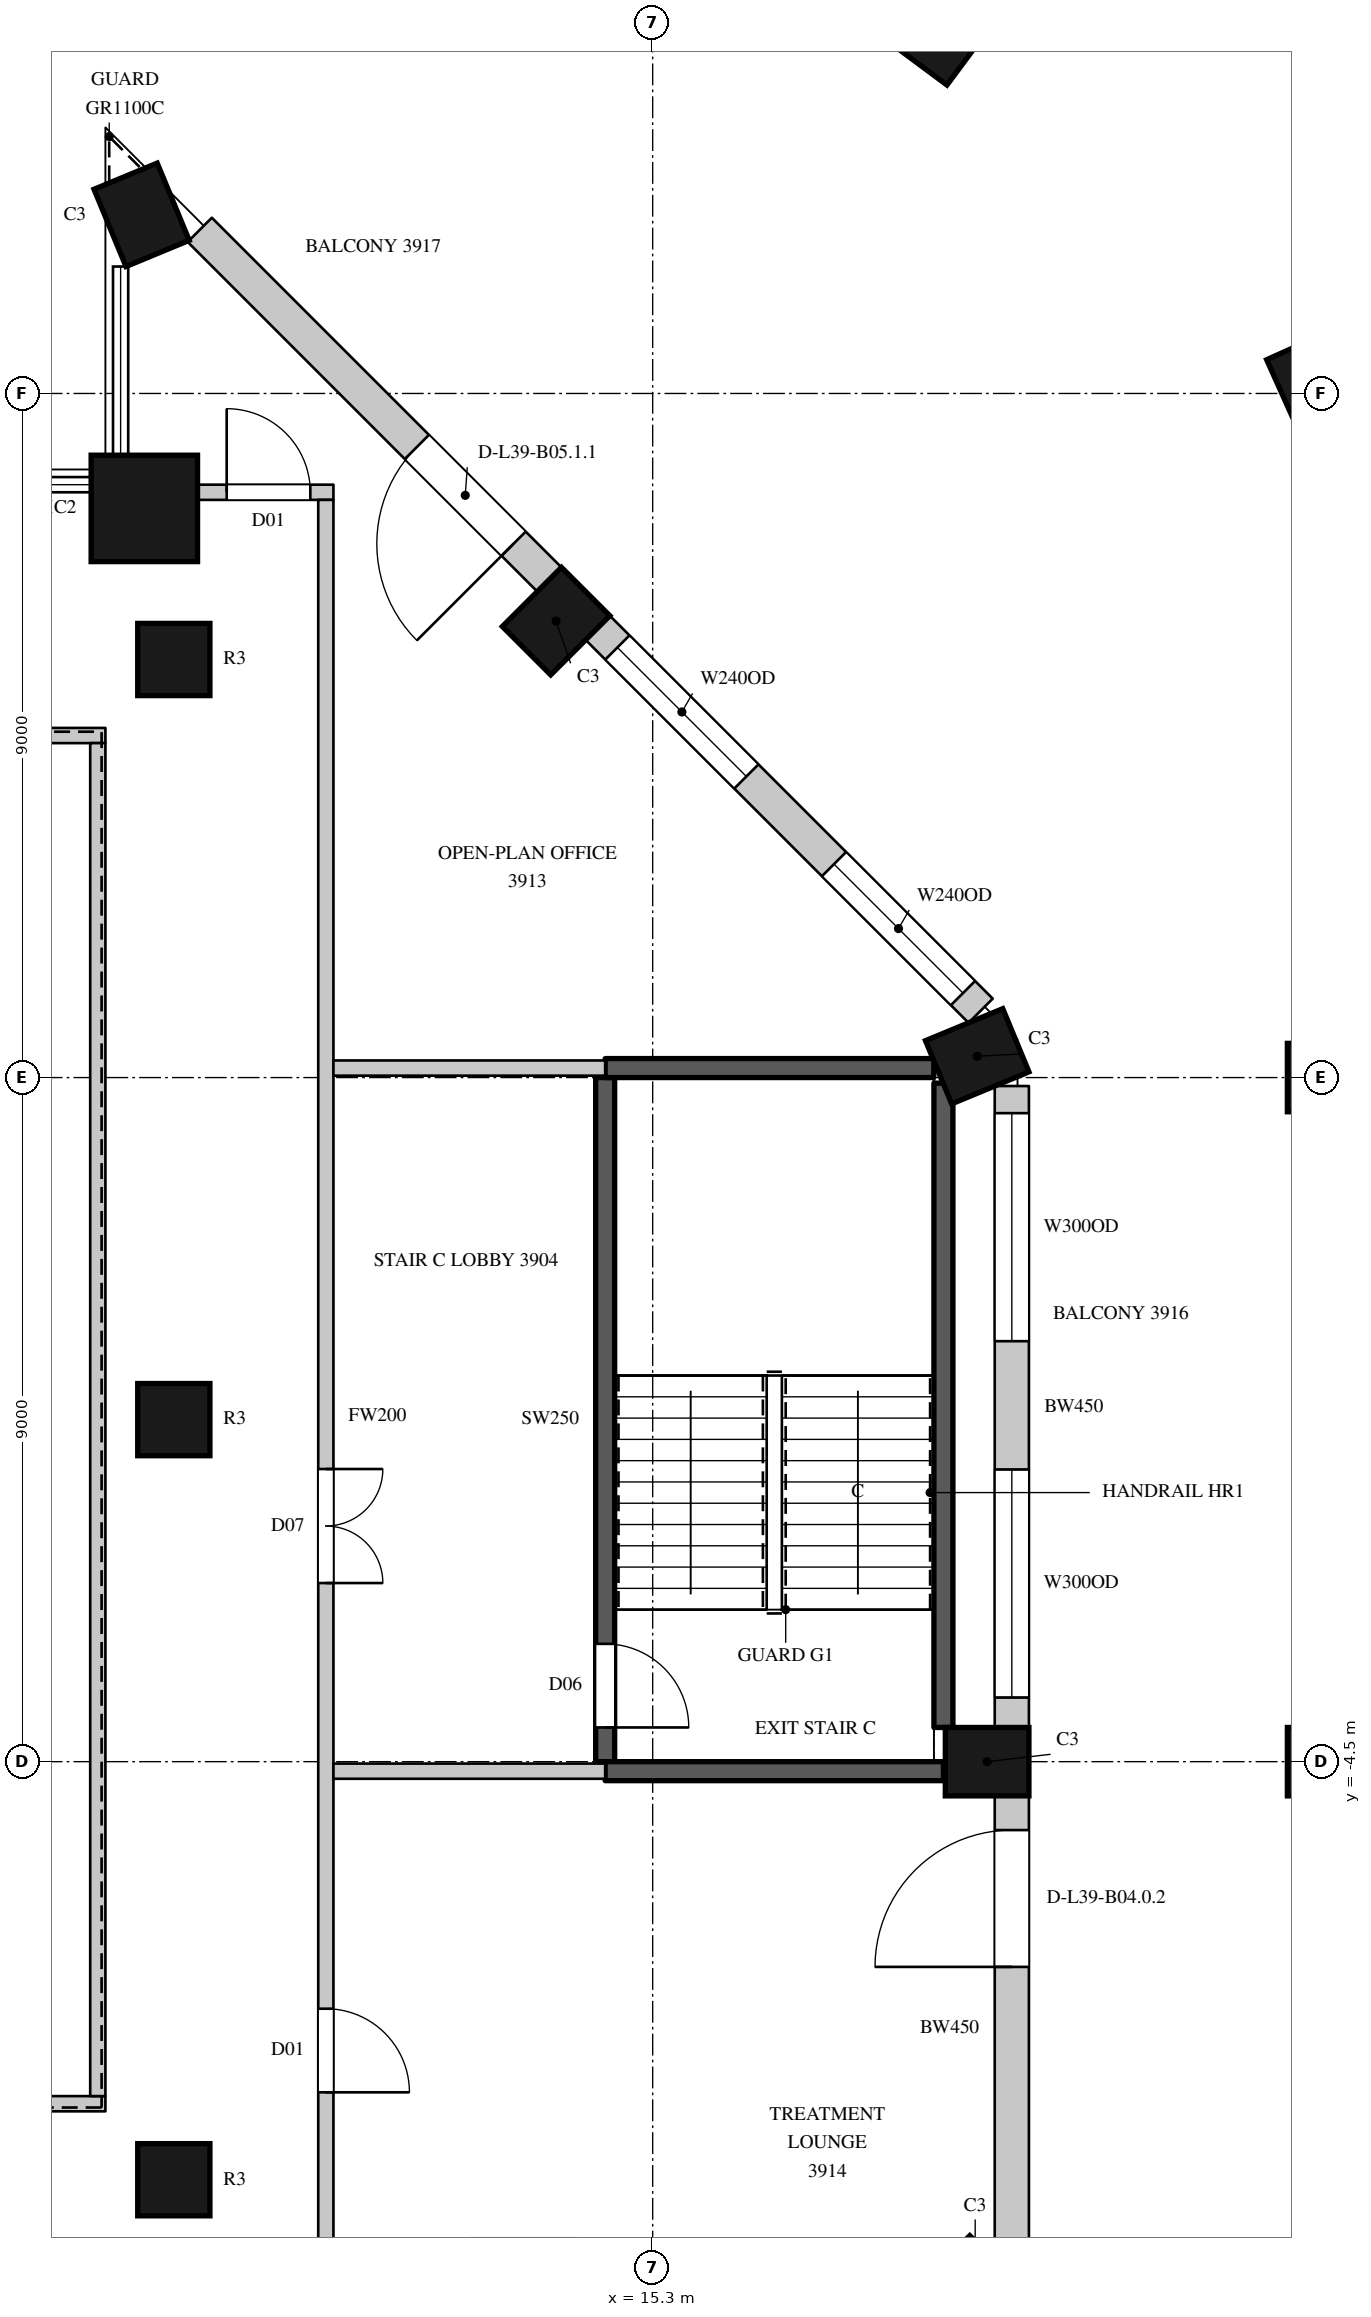
"""IFC4 building model, lengths in metres.
Left out: names, types, materials, properties, quantities, classifications, styles, units other than length and angle.
Written with IfcOpenShell. Run it as: python <this file> out.ifc"""

import sys

from ifc_helpers import new_model, si_unit, direction, frame, frame_2d, origin, origin_2d, place, context, subcontext, project, spatial, rectangle, circle, extrude, element, fill, save


model = new_model("IFC4")
c1 = context("Model", 3, precision=1e-05, world=origin(), true_north=direction((0.0, 1.0)))
c2 = subcontext(c1, "Body", "Model", "MODEL_VIEW")
j1 = project(units=[si_unit("LENGTHUNIT", "METRE"), si_unit("PLANEANGLEUNIT", "RADIAN")], contexts=[c1])
p1 = place(None, origin())
s1 = spatial("IfcSite", under=j1, at=p1, CompositionType="ELEMENT")
p2 = place(p1, origin())
s2 = spatial("IfcBuilding", under=s1, at=p2, CompositionType="ELEMENT")
p3 = place(p2, frame((0.0, 0.0, 181.0)))
s3 = spatial("IfcBuildingStorey", under=s2, at=p3, CompositionType="ELEMENT", Elevation=181.0)
for number, where, z_axis, x_axis in (
    (1, (19.543, -11.443, 0.0), (0.0, 0.0, 1.0), (0.707, 0.707, 0.0)),
    (2, (19.7, -4.5, 0.0), (0.0, 0.0, 1.0), (0.0, 1.0, 0.0)),
    (3, (19.57, 4.78, 0.0), (0.0, 0.0, 1.0), (-0.383, 0.924, 0.0)),
    (4, (14.029, 10.505, 0.0), (0.0, 0.0, 1.0), (-0.707, 0.707, 0.0)),
    (5, (8.576, 15.85, 0.0), (0.0, 0.0, 1.0), (-0.924, -0.383, 0.0)),
):
    element("IfcColumn", number, at=place(p3, frame(where, z_axis=z_axis, x_axis=x_axis)), inside=s3, PredefinedType="COLUMN", context=c2, shape_type="SweptSolid", body=[
        extrude(rectangle(XDim=0.9, YDim=1.1, at=origin_2d()), origin(), (0.0, 0.0, 1.0), 4.1),
    ])
p4 = place(p3, frame((8.612, 11.988, 0.0), z_axis=(0.0, 0.0, 1.0), x_axis=(1.0, 0.0, 0.0)))
e6 = element("IfcColumn", 6, at=p4, inside=s3, PredefinedType="COLUMN", context=c2, shape_type="SweptSolid", body=[
    extrude(circle(Radius=0.7, at=origin_2d()), origin(), (0.0, 0.0, 1.0), 4.1),
])
for number, where, z_axis, x_axis in (
    (7, (24.043, -11.443, 0.0), (0.0, 0.0, 1.0), (0.707, 0.707, 0.0)),
    (8, (24.2, -4.5, 0.0), (0.0, 0.0, 1.0), (0.0, 1.0, 0.0)),
    (9, (24.2, 4.5, 0.0), (0.0, 0.0, 1.0), (0.0, 1.0, 0.0)),
    (10, (24.064, 13.759, 0.0), (0.0, 0.0, 1.0), (-0.41, 0.912, 0.0)),
    (11, (19.138, 18.268, 0.0), (0.0, 0.0, 1.0), (-0.803, 0.596, 0.0)),
):
    element("IfcColumn", number, at=place(p3, frame(where, z_axis=z_axis, x_axis=x_axis)), inside=s3, PredefinedType="COLUMN", context=c2, shape_type="SweptSolid", body=[
        extrude(rectangle(XDim=0.9, YDim=1.1, at=origin_2d()), origin(), (0.0, 0.0, 1.0), 4.1),
    ])
for number, where, z_axis, x_axis in (
    (12, (9.0, -10.0, 0.0), (0.0, 0.0, 1.0), (1.0, 0.0, 0.0)),
    (13, (9.0, 0.0, 0.0), (0.0, 0.0, 1.0), (1.0, 0.0, 0.0)),
    (14, (9.0, 10.0, 0.0), (0.0, 0.0, 1.0), (1.0, 0.0, 0.0)),
):
    element("IfcColumn", number, at=place(p3, frame(where, z_axis=z_axis, x_axis=x_axis)), inside=s3, PredefinedType="COLUMN", context=c2, shape_type="SweptSolid", body=[
        extrude(circle(Radius=0.475, at=origin_2d()), origin(), (0.0, 0.0, 1.0), 4.1),
    ])
p5 = place(p3, frame((20.025, -11.064, 0.0), z_axis=(0.0, 0.0, 1.0), x_axis=(0.0, 1.0, 0.0)))
e15 = element("IfcWall", 15, at=p5, inside=s3, PredefinedType="SOLIDWALL", context=c2, shape_type="SweptSolid", body=[
    extrude(rectangle(XDim=6.114, YDim=0.45, at=frame_2d((3.057, 0.0))), origin(), (0.0, 0.0, 1.0), 3.8),
])
p6 = place(p5, frame((3.864, 0.0, 0.0)))
e16 = element("IfcOpeningElement", 16, at=p6, cuts=e15, PredefinedType="OPENING", context=c2, shape_type="SweptSolid", body=[
    extrude(rectangle(XDim=1.8, YDim=2.4, at=frame_2d((0.9, 1.2))), frame((0.0, 0.235, 0.0), z_axis=(0.0, -1.0, 0.0), x_axis=(1.0, 0.0, 0.0)), (0.0, 0.0, 1.0), 0.47),
])
p7 = place(p3, frame((20.025, -4.05, 0.0), z_axis=(0.0, 0.0, 1.0), x_axis=(0.0, 1.0, 0.0)))
e17 = element("IfcWall", 17, at=p7, inside=s3, PredefinedType="SOLIDWALL", context=c2, shape_type="SweptSolid", body=[
    extrude(rectangle(XDim=8.439, YDim=0.45, at=frame_2d((4.219, 0.0))), origin(), (0.0, 0.0, 1.0), 3.8),
])
p8 = place(p7, frame((0.394, 0.0, 1.05)))
e18 = element("IfcOpeningElement", 18, at=p8, cuts=e17, PredefinedType="OPENING", context=c2, shape_type="SweptSolid", body=[
    extrude(rectangle(XDim=3.0, YDim=2.4, at=frame_2d((1.5, 1.2))), frame((0.0, 0.235, 0.0), z_axis=(0.0, -1.0, 0.0), x_axis=(1.0, 0.0, 0.0)), (0.0, 0.0, 1.0), 0.47),
])
p9 = place(p7, frame((5.082, 0.0, 1.05)))
e19 = element("IfcOpeningElement", 19, at=p9, cuts=e17, PredefinedType="OPENING", context=c2, shape_type="SweptSolid", body=[
    extrude(rectangle(XDim=3.0, YDim=2.4, at=frame_2d((1.5, 1.2))), frame((0.0, 0.235, 0.0), z_axis=(0.0, -1.0, 0.0), x_axis=(1.0, 0.0, 0.0)), (0.0, 0.0, 1.0), 0.47),
])
p10 = place(p3, frame((19.615, 5.379, 0.0), z_axis=(0.0, 0.0, 1.0), x_axis=(-0.707089646058, 0.7071239159, 0.0)))
e20 = element("IfcWall", 20, at=p10, inside=s3, PredefinedType="SOLIDWALL", context=c2, shape_type="SweptSolid", body=[
    extrude(rectangle(XDim=7.124, YDim=0.45, at=frame_2d((3.562, 0.0))), origin(), (0.0, 0.0, 1.0), 3.8),
])
p11 = place(p10, frame((0.328, 0.0, 1.05)))
e21 = element("IfcOpeningElement", 21, at=p11, cuts=e20, PredefinedType="OPENING", context=c2, shape_type="SweptSolid", body=[
    extrude(rectangle(XDim=2.4, YDim=2.4, at=frame_2d((1.2, 1.2))), frame((0.0, 0.235, 0.0), z_axis=(0.0, -1.0, 0.0), x_axis=(1.0, 0.0, 0.0)), (0.0, 0.0, 1.0), 0.47),
])
p12 = place(p10, frame((4.359, 0.0, 1.05)))
e22 = element("IfcOpeningElement", 22, at=p12, cuts=e20, PredefinedType="OPENING", context=c2, shape_type="SweptSolid", body=[
    extrude(rectangle(XDim=2.4, YDim=2.4, at=frame_2d((1.2, 1.2))), frame((0.0, 0.235, 0.0), z_axis=(0.0, -1.0, 0.0), x_axis=(1.0, 0.0, 0.0)), (0.0, 0.0, 1.0), 0.47),
])
p13 = place(p3, frame((13.941, 11.053, 0.0), z_axis=(0.0, 0.0, 1.0), x_axis=(-0.707106781187, 0.707106781187, 0.0)))
e23 = element("IfcWall", 23, at=p13, inside=s3, PredefinedType="SOLIDWALL", context=c2, shape_type="SweptSolid", body=[
    extrude(rectangle(XDim=6.505, YDim=0.45, at=frame_2d((3.252, 0.0))), origin(), (0.0, 0.0, 1.0), 3.8),
])
p14 = place(p13, frame((0.665, 0.0, 0.0)))
e24 = element("IfcOpeningElement", 24, at=p14, cuts=e23, PredefinedType="OPENING", context=c2, shape_type="SweptSolid", body=[
    extrude(rectangle(XDim=1.8, YDim=2.4, at=frame_2d((0.9, 1.2))), frame((0.0, 0.235, 0.0), z_axis=(0.0, -1.0, 0.0), x_axis=(1.0, 0.0, 0.0)), (0.0, 0.0, 1.0), 0.47),
])
p15 = place(p3, frame((21.1, -0.617, 0.0), z_axis=(0.0, 0.0, 1.0), x_axis=(0.0, 1.0, 0.0)))
e25 = element("IfcWall", 25, at=p15, inside=s3, PredefinedType="SOLIDWALL", context=c2, shape_type="SweptSolid", body=[
    extrude(rectangle(XDim=2.567, YDim=0.45, at=frame_2d((1.283, 0.0))), origin(), (0.0, 0.0, 1.0), 0.6),
])
p16 = place(p3, frame((12.251, 14.263, 0.0), z_axis=(0.0, 0.0, 1.0), x_axis=(-0.707039709166, 0.707173846846, 0.0)))
e26 = element("IfcWall", 26, at=p16, inside=s3, PredefinedType="SOLIDWALL", context=c2, shape_type="SweptSolid", body=[
    extrude(rectangle(XDim=1.82, YDim=0.45, at=frame_2d((0.91, 0.0))), origin(), (0.0, 0.0, 1.0), 0.6),
])
for number, where, z_axis, x_axis in (
    (27, (-2.48, -9.0, 0.0), (0.0, 0.0, 1.0), (1.0, 0.0, 0.0)),
    (28, (-2.48, 9.0, 0.0), (0.0, 0.0, 1.0), (1.0, 0.0, 0.0)),
):
    element("IfcWall", number, at=place(p3, frame(where, z_axis=z_axis, x_axis=x_axis)), inside=s3, PredefinedType="PARTITIONING", context=c2, shape_type="SweptSolid", body=[
        extrude(rectangle(XDim=10.58, YDim=0.2, at=frame_2d((5.29, 0.0))), origin(), (0.0, 0.0, 1.0), 3.8),
    ])
p17 = place(p3, frame((8.0, -8.9, 0.0), z_axis=(0.0, 0.0, 1.0), x_axis=(0.0, 1.0, 0.0)))
e29 = element("IfcWall", 29, at=p17, inside=s3, PredefinedType="PARTITIONING", context=c2, shape_type="SweptSolid", body=[
    extrude(rectangle(XDim=17.8, YDim=0.2, at=frame_2d((8.9, 0.0))), origin(), (0.0, 0.0, 1.0), 3.8),
])
p18 = place(p3, frame((9.296, 12.2, 0.0), z_axis=(0.0, 0.0, 1.0), x_axis=(1.0, 0.0, 0.0)))
e30 = element("IfcWall", 30, at=p18, inside=s3, PredefinedType="PARTITIONING", context=c2, shape_type="SweptSolid", body=[
    extrude(rectangle(XDim=1.804, YDim=0.2, at=frame_2d((0.902, 0.0))), origin(), (0.0, 0.0, 1.0), 3.8),
])
p19 = place(p18, frame((0.4, 0.0, 0.0)))
e31 = element("IfcOpeningElement", 31, at=p19, cuts=e30, PredefinedType="OPENING", context=c2, shape_type="SweptSolid", body=[
    extrude(rectangle(XDim=1.1, YDim=2.4, at=frame_2d((0.55, 1.2))), frame((0.0, 0.11, 0.0), z_axis=(0.0, -1.0, 0.0), x_axis=(1.0, 0.0, 0.0)), (0.0, 0.0, 1.0), 0.22),
])
p20 = place(p3, frame((11.0, -12.0, 0.0), z_axis=(0.0, 0.0, 1.0), x_axis=(0.0, 1.0, 0.0)))
e32 = element("IfcWall", 32, at=p20, inside=s3, PredefinedType="PARTITIONING", context=c2, shape_type="SweptSolid", body=[
    extrude(rectangle(XDim=24.1, YDim=0.2, at=frame_2d((12.05, 0.0))), origin(), (0.0, 0.0, 1.0), 3.8),
])
p21 = place(p20, frame((9.85, 0.0, 0.0)))
e33 = element("IfcOpeningElement", 33, at=p21, cuts=e32, PredefinedType="OPENING", context=c2, shape_type="SweptSolid", body=[
    extrude(rectangle(XDim=1.5, YDim=2.4, at=frame_2d((0.75, 1.2))), frame((0.0, 0.11, 0.0), z_axis=(0.0, -1.0, 0.0), x_axis=(1.0, 0.0, 0.0)), (0.0, 0.0, 1.0), 0.22),
])
p22 = place(p20, frame((3.15, 0.0, 0.0)))
e34 = element("IfcOpeningElement", 34, at=p22, cuts=e32, PredefinedType="OPENING", context=c2, shape_type="SweptSolid", body=[
    extrude(rectangle(XDim=1.1, YDim=2.4, at=frame_2d((0.55, 1.2))), frame((0.0, 0.11, 0.0), z_axis=(0.0, -1.0, 0.0), x_axis=(1.0, 0.0, 0.0)), (0.0, 0.0, 1.0), 0.22),
])
for number, where, z_axis, x_axis in (
    (35, (11.1, -4.625, 0.0), (0.0, 0.0, 1.0), (1.0, 0.0, 0.0)),
    (36, (11.1, 4.625, 0.0), (0.0, 0.0, 1.0), (1.0, 0.0, 0.0)),
):
    element("IfcWall", number, at=place(p3, frame(where, z_axis=z_axis, x_axis=x_axis)), inside=s3, PredefinedType="PARTITIONING", context=c2, shape_type="SweptSolid", body=[
        extrude(rectangle(XDim=3.575, YDim=0.2, at=frame_2d((1.788, 0.0))), origin(), (0.0, 0.0, 1.0), 3.8),
    ])
p23 = place(p3, frame((14.675, -4.5, 0.0), z_axis=(0.0, 0.0, 1.0), x_axis=(0.0, 1.0, 0.0)))
e37 = element("IfcWall", 37, at=p23, inside=s3, PredefinedType="SHEAR", context=c2, shape_type="SweptSolid", body=[
    extrude(rectangle(XDim=9.0, YDim=0.25, at=frame_2d((4.5, 0.0))), origin(), (0.0, 0.0, 1.0), 3.8),
])
p24 = place(p23, frame((0.45, 0.0, 0.0)))
e38 = element("IfcOpeningElement", 38, at=p24, cuts=e37, PredefinedType="OPENING", context=c2, shape_type="SweptSolid", body=[
    extrude(rectangle(XDim=1.1, YDim=2.2, at=frame_2d((0.55, 1.1))), frame((0.0, 0.135, 0.0), z_axis=(0.0, -1.0, 0.0), x_axis=(1.0, 0.0, 0.0)), (0.0, 0.0, 1.0), 0.27),
])
p25 = place(p3, frame((14.675, -4.625, 0.0), z_axis=(0.0, 0.0, 1.0), x_axis=(1.0, 0.0, 0.0)))
e39 = element("IfcWall", 39, at=p25, inside=s3, PredefinedType="SHEAR", context=c2, shape_type="SweptSolid", body=[
    extrude(rectangle(XDim=4.45, YDim=0.25, at=frame_2d((2.225, 0.0))), origin(), (0.0, 0.0, 1.0), 3.8),
])
p26 = place(p3, frame((14.675, 4.625, 0.0), z_axis=(0.0, 0.0, 1.0), x_axis=(1.0, 0.0, 0.0)))
e40 = element("IfcWall", 40, at=p26, inside=s3, PredefinedType="SHEAR", context=c2, shape_type="SweptSolid", body=[
    extrude(rectangle(XDim=4.324, YDim=0.25, at=frame_2d((2.162, 0.0))), origin(), (0.0, 0.0, 1.0), 3.8),
])
p27 = place(p3, frame((19.125, -4.05, 0.0), z_axis=(0.0, 0.0, 1.0), x_axis=(0.0, 1.0, 0.0)))
e41 = element("IfcWall", 41, at=p27, inside=s3, PredefinedType="SHEAR", context=c2, shape_type="SweptSolid", body=[
    extrude(rectangle(XDim=8.477, YDim=0.25, at=frame_2d((4.238, 0.0))), origin(), (0.0, 0.0, 1.0), 3.8),
])
p28 = place(p6, origin())
e42 = element("IfcDoor", 42, at=p28, inside=s3, OperationType="SLIDING_TO_LEFT", PredefinedType="DOOR", context=c2, shape_type="SweptSolid", body=[
    extrude(rectangle(XDim=1.8, YDim=2.4, at=frame_2d((0.9, 1.2))), frame((0.0, 0.13, 0.0), z_axis=(0.0, -1.0, 0.0), x_axis=(1.0, 0.0, 0.0)), (0.0, 0.0, 1.0), 0.05),
])
fill(e16, e42)
p29 = place(p8, origin())
e43 = element("IfcWindow", 43, at=p29, inside=s3, PartitioningType="SINGLE_PANEL", PredefinedType="WINDOW", context=c2, shape_type="SweptSolid", body=[
    extrude(rectangle(XDim=3.0, YDim=2.4, at=frame_2d((1.5, 1.2))), frame((0.0, 0.135, 0.0), z_axis=(0.0, -1.0, 0.0), x_axis=(1.0, 0.0, 0.0)), (0.0, 0.0, 1.0), 0.06),
])
fill(e18, e43)
p30 = place(p9, origin())
e44 = element("IfcWindow", 44, at=p30, inside=s3, PartitioningType="SINGLE_PANEL", PredefinedType="WINDOW", context=c2, shape_type="SweptSolid", body=[
    extrude(rectangle(XDim=3.0, YDim=2.4, at=frame_2d((1.5, 1.2))), frame((0.0, 0.135, 0.0), z_axis=(0.0, -1.0, 0.0), x_axis=(1.0, 0.0, 0.0)), (0.0, 0.0, 1.0), 0.06),
])
fill(e19, e44)
p31 = place(p11, origin())
e45 = element("IfcWindow", 45, at=p31, inside=s3, PartitioningType="SINGLE_PANEL", PredefinedType="WINDOW", context=c2, shape_type="SweptSolid", body=[
    extrude(rectangle(XDim=2.4, YDim=2.4, at=frame_2d((1.2, 1.2))), frame((0.0, 0.135, 0.0), z_axis=(0.0, -1.0, 0.0), x_axis=(1.0, 0.0, 0.0)), (0.0, 0.0, 1.0), 0.06),
])
fill(e21, e45)
p32 = place(p12, origin())
e46 = element("IfcWindow", 46, at=p32, inside=s3, PartitioningType="SINGLE_PANEL", PredefinedType="WINDOW", context=c2, shape_type="SweptSolid", body=[
    extrude(rectangle(XDim=2.4, YDim=2.4, at=frame_2d((1.2, 1.2))), frame((0.0, 0.135, 0.0), z_axis=(0.0, -1.0, 0.0), x_axis=(1.0, 0.0, 0.0)), (0.0, 0.0, 1.0), 0.06),
])
fill(e22, e46)
p33 = place(p14, origin())
e47 = element("IfcDoor", 47, at=p33, inside=s3, OperationType="SLIDING_TO_LEFT", PredefinedType="DOOR", context=c2, shape_type="SweptSolid", body=[
    extrude(rectangle(XDim=1.8, YDim=2.4, at=frame_2d((0.9, 1.2))), frame((0.0, 0.13, 0.0), z_axis=(0.0, -1.0, 0.0), x_axis=(1.0, 0.0, 0.0)), (0.0, 0.0, 1.0), 0.05),
])
fill(e24, e47)
p34 = place(p21, origin())
e48 = element("IfcDoor", 48, at=p34, inside=s3, OperationType="DOUBLE_DOOR_SINGLE_SWING", PredefinedType="DOOR", context=c2, shape_type="SweptSolid", body=[
    extrude(rectangle(XDim=1.5, YDim=2.4, at=frame_2d((0.75, 1.2))), frame((0.0, 0.025, 0.0), z_axis=(0.0, -1.0, 0.0), x_axis=(1.0, 0.0, 0.0)), (0.0, 0.0, 1.0), 0.05),
])
fill(e33, e48)
p35 = place(p19, origin())
e49 = element("IfcDoor", 49, at=p35, inside=s3, OperationType="SINGLE_SWING_LEFT", PredefinedType="DOOR", context=c2, shape_type="SweptSolid", body=[
    extrude(rectangle(XDim=1.1, YDim=2.4, at=frame_2d((0.55, 1.2))), frame((0.0, 0.025, 0.0), z_axis=(0.0, -1.0, 0.0), x_axis=(1.0, 0.0, 0.0)), (0.0, 0.0, 1.0), 0.05),
])
fill(e31, e49)
p36 = place(p22, origin())
e50 = element("IfcDoor", 50, at=p36, inside=s3, OperationType="SINGLE_SWING_RIGHT", PredefinedType="DOOR", context=c2, shape_type="SweptSolid", body=[
    extrude(rectangle(XDim=1.1, YDim=2.4, at=frame_2d((0.55, 1.2))), frame((0.0, 0.025, 0.0), z_axis=(0.0, -1.0, 0.0), x_axis=(1.0, 0.0, 0.0)), (0.0, 0.0, 1.0), 0.05),
])
fill(e34, e50)
p37 = place(p24, origin())
e51 = element("IfcDoor", 51, at=p37, inside=s3, OperationType="SINGLE_SWING_RIGHT", PredefinedType="DOOR", context=c2, shape_type="SweptSolid", body=[
    extrude(rectangle(XDim=1.1, YDim=2.2, at=frame_2d((0.55, 1.1))), frame((0.0, 0.025, 0.0), z_axis=(0.0, -1.0, 0.0), x_axis=(1.0, 0.0, 0.0)), (0.0, 0.0, 1.0), 0.05),
])
fill(e38, e51)
save(model, sys.argv[1])
